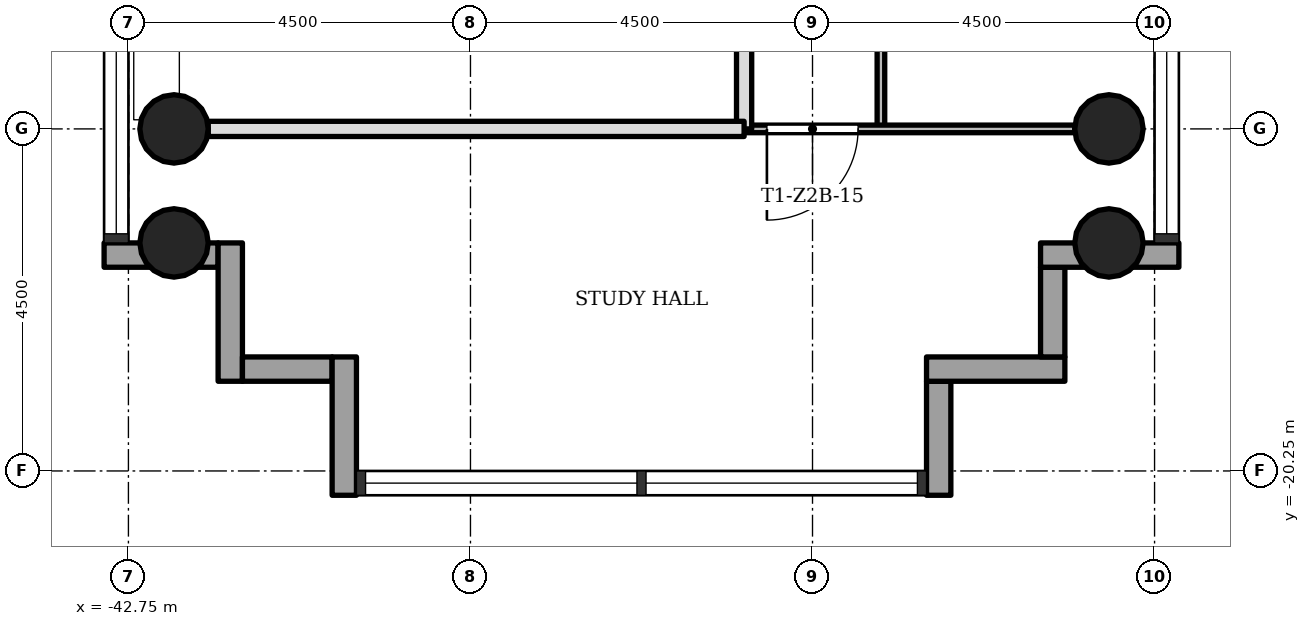
"""IFC4 building model, lengths in metres.
Left out: names, types, materials, properties, quantities, classifications, styles, units other than length and angle.
Written with IfcOpenShell. Run it as: python <this file> out.ifc"""

import sys

from ifc_helpers import new_model, si_unit, direction, frame, frame_2d, origin, origin_2d, place, context, subcontext, project, spatial, rectangle, hollow_circle, extrude, element, fill, save


model = new_model("IFC4")
c1 = context("Model", 3, precision=1e-05, world=origin(), true_north=direction((0.0, 1.0)))
c2 = subcontext(c1, "Body", "Model", "MODEL_VIEW")
j1 = project(units=[si_unit("LENGTHUNIT", "METRE"), si_unit("PLANEANGLEUNIT", "RADIAN")], contexts=[c1])
p1 = place(None, origin())
s1 = spatial("IfcSite", under=j1, at=p1, CompositionType="ELEMENT")
p2 = place(p1, origin())
s2 = spatial("IfcBuilding", under=s1, at=p2, CompositionType="ELEMENT")
p3 = place(p2, frame((0.0, 0.0, 76.6)))
s3 = spatial("IfcBuildingStorey", under=s2, at=p3, CompositionType="ELEMENT", Elevation=76.6)
for number, where, z_axis, x_axis in (
    (1, (-42.15, -15.75, 0.0), (0.0, 0.0, 1.0), (1.0, 0.0, 0.0)),
    (2, (-29.85, -15.75, 0.0), (0.0, 0.0, 1.0), (1.0, 0.0, 0.0)),
    (3, (-42.15, -17.25, 0.0), (0.0, 0.0, 1.0), (1.0, 0.0, 0.0)),
    (4, (-29.85, -17.25, 0.0), (0.0, 0.0, 1.0), (1.0, 0.0, 0.0)),
):
    element("IfcColumn", number, at=place(p3, frame(where, z_axis=z_axis, x_axis=x_axis)), inside=s3, PredefinedType="COLUMN", context=c2, shape_type="SweptSolid", body=[
        extrude(hollow_circle(Radius=0.45, WallThickness=0.032, at=origin_2d()), origin(), (0.0, 0.0, 1.0), 3.4),
    ])
p4 = place(p3, frame((-43.07, -17.41, -0.3), z_axis=(0.0, 0.0, 1.0), x_axis=(1.0, 0.0, 0.0)))
e5 = element("IfcWall", 5, at=p4, inside=s3, PredefinedType="STANDARD", context=c2, shape_type="SweptSolid", body=[
    extrude(rectangle(XDim=1.5, YDim=0.32, at=frame_2d((0.75, 0.0))), origin(), (0.0, 0.0, 1.0), 3.4),
])
p5 = place(p3, frame((-41.41, -17.25, -0.3), z_axis=(0.0, 0.0, 1.0), x_axis=(0.0, -1.0, 0.0)))
e6 = element("IfcWall", 6, at=p5, inside=s3, PredefinedType="STANDARD", context=c2, shape_type="SweptSolid", body=[
    extrude(rectangle(XDim=1.82, YDim=0.32, at=frame_2d((0.91, 0.0))), origin(), (0.0, 0.0, 1.0), 3.4),
])
p6 = place(p3, frame((-41.25, -18.91, -0.3), z_axis=(0.0, 0.0, 1.0), x_axis=(1.0, 0.0, 0.0)))
e7 = element("IfcWall", 7, at=p6, inside=s3, PredefinedType="STANDARD", context=c2, shape_type="SweptSolid", body=[
    extrude(rectangle(XDim=1.18, YDim=0.32, at=frame_2d((0.59, 0.0))), origin(), (0.0, 0.0, 1.0), 3.4),
])
p7 = place(p3, frame((-39.91, -18.75, -0.3), z_axis=(0.0, 0.0, 1.0), x_axis=(0.0, -1.0, 0.0)))
e8 = element("IfcWall", 8, at=p7, inside=s3, PredefinedType="STANDARD", context=c2, shape_type="SweptSolid", body=[
    extrude(rectangle(XDim=1.82, YDim=0.32, at=frame_2d((0.91, 0.0))), origin(), (0.0, 0.0, 1.0), 3.4),
])
p8 = place(p3, frame((-32.09, -20.57, -0.3), z_axis=(0.0, 0.0, 1.0), x_axis=(0.0, 1.0, 0.0)))
e9 = element("IfcWall", 9, at=p8, inside=s3, PredefinedType="STANDARD", context=c2, shape_type="SweptSolid", body=[
    extrude(rectangle(XDim=1.5, YDim=0.32, at=frame_2d((0.75, 0.0))), origin(), (0.0, 0.0, 1.0), 3.4),
])
p9 = place(p3, frame((-32.25, -18.91, -0.3), z_axis=(0.0, 0.0, 1.0), x_axis=(1.0, 0.0, 0.0)))
e10 = element("IfcWall", 10, at=p9, inside=s3, PredefinedType="STANDARD", context=c2, shape_type="SweptSolid", body=[
    extrude(rectangle(XDim=1.82, YDim=0.32, at=frame_2d((0.91, 0.0))), origin(), (0.0, 0.0, 1.0), 3.4),
])
p10 = place(p3, frame((-30.59, -18.75, -0.3), z_axis=(0.0, 0.0, 1.0), x_axis=(0.0, 1.0, 0.0)))
e11 = element("IfcWall", 11, at=p10, inside=s3, PredefinedType="STANDARD", context=c2, shape_type="SweptSolid", body=[
    extrude(rectangle(XDim=1.18, YDim=0.32, at=frame_2d((0.59, 0.0))), origin(), (0.0, 0.0, 1.0), 3.4),
])
p11 = place(p3, frame((-30.75, -17.41, -0.3), z_axis=(0.0, 0.0, 1.0), x_axis=(1.0, 0.0, 0.0)))
e12 = element("IfcWall", 12, at=p11, inside=s3, PredefinedType="STANDARD", context=c2, shape_type="SweptSolid", body=[
    extrude(rectangle(XDim=1.82, YDim=0.32, at=frame_2d((0.91, 0.0))), origin(), (0.0, 0.0, 1.0), 3.4),
])
p12 = place(p3, frame((-34.65, -15.75, 0.0), z_axis=(0.0, 0.0, 1.0), x_axis=(0.0, 1.0, 0.0)))
e13 = element("IfcWall", 13, at=p12, inside=s3, PredefinedType="SOLIDWALL", context=c2, shape_type="SweptSolid", body=[
    extrude(rectangle(XDim=7.2, YDim=0.2, at=frame_2d((3.6, 0.0))), origin(), (0.0, 0.0, 1.0), 3.0),
])
p13 = place(p12, frame((1.95, 0.0, 0.0)))
e14 = element("IfcOpeningElement", 14, at=p13, cuts=e13, PredefinedType="OPENING", context=c2, shape_type="SweptSolid", body=[
    extrude(rectangle(XDim=0.9, YDim=2.1, at=frame_2d((0.45, 1.05))), frame((0.0, 0.11, 0.0), z_axis=(0.0, -1.0, 0.0), x_axis=(1.0, 0.0, 0.0)), (0.0, 0.0, 1.0), 0.22),
])
p14 = place(p3, frame((-32.85, -15.75, 0.0), z_axis=(0.0, 0.0, 1.0), x_axis=(0.0, 1.0, 0.0)))
e15 = element("IfcWall", 15, at=p14, inside=s3, PredefinedType="PARTITIONING", context=c2, shape_type="SweptSolid", body=[
    extrude(rectangle(XDim=9.0, YDim=0.1, at=frame_2d((4.5, 0.0))), origin(), (0.0, 0.0, 1.0), 3.0),
])
p15 = place(p14, frame((5.55, 0.0, 0.0)))
e16 = element("IfcOpeningElement", 16, at=p15, cuts=e15, PredefinedType="OPENING", context=c2, shape_type="SweptSolid", body=[
    extrude(rectangle(XDim=0.9, YDim=2.1, at=frame_2d((0.45, 1.05))), frame((0.0, 0.06, 0.0), z_axis=(0.0, -1.0, 0.0), x_axis=(1.0, 0.0, 0.0)), (0.0, 0.0, 1.0), 0.12),
])
p16 = place(p3, frame((-34.65, -15.75, 0.0), z_axis=(0.0, 0.0, 1.0), x_axis=(1.0, 0.0, 0.0)))
e17 = element("IfcWall", 17, at=p16, inside=s3, PredefinedType="PARTITIONING", context=c2, shape_type="SweptSolid", body=[
    extrude(rectangle(XDim=4.35, YDim=0.1, at=frame_2d((2.175, 0.0))), origin(), (0.0, 0.0, 1.0), 3.0),
])
p17 = place(p16, frame((0.3, 0.0, 0.0)))
e18 = element("IfcOpeningElement", 18, at=p17, cuts=e17, PredefinedType="OPENING", context=c2, shape_type="SweptSolid", body=[
    extrude(rectangle(XDim=1.2, YDim=2.1, at=frame_2d((0.6, 1.05))), frame((0.0, 0.06, 0.0), z_axis=(0.0, -1.0, 0.0), x_axis=(1.0, 0.0, 0.0)), (0.0, 0.0, 1.0), 0.12),
])
p18 = place(p3, frame((-41.7, -15.75, 0.0), z_axis=(0.0, 0.0, 1.0), x_axis=(1.0, 0.0, 0.0)))
e19 = element("IfcWall", 19, at=p18, inside=s3, PredefinedType="SOLIDWALL", context=c2, shape_type="SweptSolid", body=[
    extrude(rectangle(XDim=7.05, YDim=0.2, at=frame_2d((3.525, 0.0))), origin(), (0.0, 0.0, 1.0), 3.0),
])
p19 = place(p17, origin())
e20 = element("IfcDoor", 20, at=p19, inside=s3, OperationType="SINGLE_SWING_LEFT", PredefinedType="DOOR", context=c2, shape_type="SweptSolid", body=[
    extrude(rectangle(XDim=1.2, YDim=2.1, at=frame_2d((0.6, 1.05))), frame((0.0, 0.025, 0.0), z_axis=(0.0, -1.0, 0.0), x_axis=(1.0, 0.0, 0.0)), (0.0, 0.0, 1.0), 0.05),
])
fill(e18, e20)
save(model, sys.argv[1])
